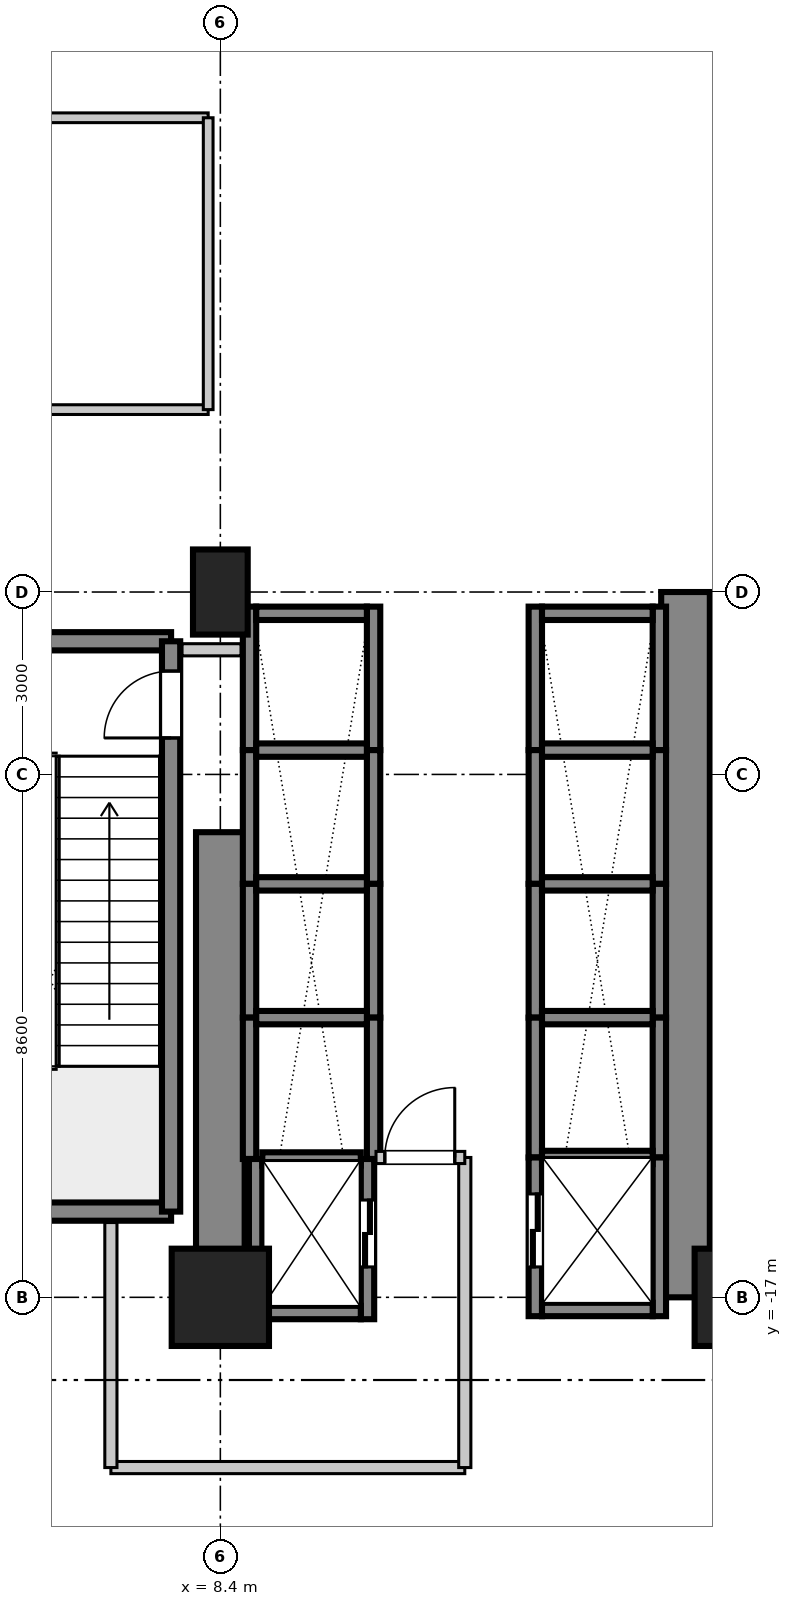
"""IFC4 building model, lengths in metres.
Left out: names, types, materials, properties, quantities, classifications, styles, units other than length and angle.
Written with IfcOpenShell. Run it as: python <this file> out.ifc"""

import sys

from ifc_helpers import new_model, si_unit, direction, frame, frame_2d, origin, origin_2d, place, context, subcontext, project, spatial, rectangle, extrude, source, transform, mapped, element, fill, save


model = new_model("IFC4")
c1 = context("Model", 3, precision=1e-05, world=origin(), true_north=direction((0.0, 1.0)))
c2 = subcontext(c1, "Body", "Model", "MODEL_VIEW")
j1 = project(units=[si_unit("LENGTHUNIT", "METRE"), si_unit("PLANEANGLEUNIT", "RADIAN")], contexts=[c1])
p1 = place(None, origin())
s1 = spatial("IfcSite", under=j1, at=p1, CompositionType="ELEMENT")
p2 = place(p1, origin())
s2 = spatial("IfcBuilding", under=s1, at=p2, CompositionType="ELEMENT")
p3 = place(p2, frame((0.0, 0.0, 21.6)))
s3 = spatial("IfcBuildingStorey", under=s2, at=p3, CompositionType="ELEMENT", Elevation=21.6)
m1 = source(origin(), c2, "Body", "SweptSolid", [
    extrude(rectangle(XDim=1.6, YDim=1.6, at=origin_2d()), origin(), (0.0, 0.0, 1.0), 5.355),
])
p4 = place(p3, frame((8.4, -17.0, 0.0), z_axis=(0.0, 0.0, 1.0), x_axis=(1.0, 0.0, 0.0)))
e1 = element("IfcColumn", 1, at=p4, inside=s3, PredefinedType="COLUMN", context=c2, shape_type="MappedRepresentation", body=[
    mapped(m1, transform((0.0, 0.0, 0.0), scale=1.0)),
])
m2 = source(origin(), c2, "Body", "SweptSolid", [
    extrude(rectangle(XDim=0.9, YDim=1.4, at=origin_2d()), origin(), (0.0, 0.0, 1.0), 5.355),
])
p5 = place(p3, frame((8.4, -5.4, 0.0), z_axis=(0.0, 0.0, 1.0), x_axis=(1.0, 0.0, 0.0)))
e2 = element("IfcColumn", 2, at=p5, inside=s3, PredefinedType="PILASTER", context=c2, shape_type="MappedRepresentation", body=[
    mapped(m2, transform((0.0, 0.0, 0.0), scale=1.0)),
])
p6 = place(p3, frame((17.0, -17.0, 0.0), z_axis=(0.0, 0.0, 1.0), x_axis=(1.0, 0.0, 0.0)))
e3 = element("IfcColumn", 3, at=p6, inside=s3, PredefinedType="COLUMN", context=c2, shape_type="MappedRepresentation", body=[
    mapped(m1, transform((0.0, 0.0, 0.0), scale=1.0)),
])
m3 = source(origin(), c2, "Body", "SweptSolid", [
    extrude(rectangle(XDim=7.65, YDim=0.8, at=frame_2d((3.825, 0.0))), origin(), (0.0, 0.0, 1.0), 4.98),
])
p7 = place(p3, frame((8.4, -17.0, 0.0), z_axis=(0.0, 0.0, 1.0), x_axis=(0.0, 1.0, 0.0)))
e4 = element("IfcWall", 4, at=p7, inside=s3, PredefinedType="SHEAR", context=c2, shape_type="MappedRepresentation", body=[
    mapped(m3, transform((0.0, 0.0, 0.0), scale=1.0)),
])
m4 = source(origin(), c2, "Body", "SweptSolid", [
    extrude(rectangle(XDim=11.6, YDim=0.8, at=frame_2d((5.8, 0.0))), origin(), (0.0, 0.0, 1.0), 4.98),
])
p8 = place(p3, frame((16.05, -17.0, 0.0), z_axis=(0.0, 0.0, 1.0), x_axis=(0.0, 1.0, 0.0)))
e5 = element("IfcWall", 5, at=p8, inside=s3, PredefinedType="SHEAR", context=c2, shape_type="MappedRepresentation", body=[
    mapped(m4, transform((0.0, 0.0, 0.0), scale=1.0)),
])
m5 = source(origin(), c2, "Body", "SweptSolid", [
    extrude(rectangle(XDim=3.98, YDim=0.3, at=frame_2d((1.99, 0.0))), origin(), (0.0, 0.0, 1.0), 4.98),
])
for number, where, z_axis, x_axis in (
    (6, (3.61, -15.59, 0.0), (0.0, 0.0, 1.0), (1.0, 0.0, 0.0)),
    (7, (3.61, -6.21, 0.0), (0.0, 0.0, 1.0), (1.0, 0.0, 0.0)),
):
    element("IfcWall", number, at=place(p3, frame(where, z_axis=z_axis, x_axis=x_axis)), inside=s3, PredefinedType="SHEAR", context=c2, shape_type="MappedRepresentation", body=[
        mapped(m5, transform((0.0, 0.0, 0.0), scale=1.0)),
    ])
m6 = source(origin(), c2, "Body", "SweptSolid", [
    extrude(rectangle(XDim=9.38, YDim=0.3, at=frame_2d((4.69, 0.0))), origin(), (0.0, 0.0, 1.0), 4.98),
])
p9 = place(p3, frame((7.59, -15.59, 0.0), z_axis=(0.0, 0.0, 1.0), x_axis=(0.0, 1.0, 0.0)))
e8 = element("IfcWall", 8, at=p9, inside=s3, PredefinedType="SHEAR", context=c2, shape_type="MappedRepresentation", body=[
    mapped(m6, transform((0.0, 0.0, 0.0), scale=1.0)),
])
p10 = place(p9, frame((7.79, 0.0, 0.0)))
e9 = element("IfcOpeningElement", 9, at=p10, cuts=e8, PredefinedType="OPENING", context=c2, shape_type="SweptSolid", body=[
    extrude(rectangle(XDim=1.1, YDim=2.15, at=frame_2d((0.55, 1.075))), frame((0.0, 0.16, 0.0), z_axis=(0.0, -1.0, 0.0), x_axis=(1.0, 0.0, 0.0)), (0.0, 0.0, 1.0), 0.32),
])
m7 = source(origin(), c2, "Body", "SweptSolid", [
    extrude(rectangle(XDim=2.36, YDim=0.22, at=frame_2d((1.18, 0.0))), origin(), (0.0, 0.0, 1.0), 4.98),
])
for number, where, z_axis, x_axis in (
    (10, (13.58, -8.0, 0.0), (0.0, 0.0, 1.0), (0.0, 1.0, 0.0)),
    (11, (15.62, -8.0, 0.0), (0.0, 0.0, 1.0), (0.0, 1.0, 0.0)),
):
    element("IfcWall", number, at=place(p3, frame(where, z_axis=z_axis, x_axis=x_axis)), inside=s3, PredefinedType="SHEAR", context=c2, shape_type="MappedRepresentation", body=[
        mapped(m7, transform((0.0, 0.0, 0.0), scale=1.0)),
    ])
m8 = source(origin(), c2, "Body", "SweptSolid", [
    extrude(rectangle(XDim=1.82, YDim=0.22, at=frame_2d((0.91, 0.0))), origin(), (0.0, 0.0, 1.0), 4.98),
])
p11 = place(p3, frame((13.69, -5.75, 0.0), z_axis=(0.0, 0.0, 1.0), x_axis=(1.0, 0.0, 0.0)))
e12 = element("IfcWall", 12, at=p11, inside=s3, PredefinedType="SHEAR", context=c2, shape_type="MappedRepresentation", body=[
    mapped(m8, transform((0.0, 0.0, 0.0), scale=1.0)),
])
m9 = source(origin(), c2, "Body", "SweptSolid", [
    extrude(rectangle(XDim=2.2, YDim=0.22, at=frame_2d((1.1, 0.0))), origin(), (0.0, 0.0, 1.0), 4.98),
])
for number, where, z_axis, x_axis in (
    (13, (13.58, -10.2, 0.0), (0.0, 0.0, 1.0), (0.0, 1.0, 0.0)),
    (14, (15.62, -10.2, 0.0), (0.0, 0.0, 1.0), (0.0, 1.0, 0.0)),
):
    element("IfcWall", number, at=place(p3, frame(where, z_axis=z_axis, x_axis=x_axis)), inside=s3, PredefinedType="SHEAR", context=c2, shape_type="MappedRepresentation", body=[
        mapped(m9, transform((0.0, 0.0, 0.0), scale=1.0)),
    ])
m10 = source(origin(), c2, "Body", "SweptSolid", [
    extrude(rectangle(XDim=1.82, YDim=0.22, at=frame_2d((0.91, 0.0))), origin(), (0.0, 0.0, 1.0), 5.4),
])
p12 = place(p3, frame((13.69, -8.0, 0.0), z_axis=(0.0, 0.0, 1.0), x_axis=(1.0, 0.0, 0.0)))
e15 = element("IfcWall", 15, at=p12, inside=s3, PredefinedType="SHEAR", context=c2, shape_type="MappedRepresentation", body=[
    mapped(m10, transform((0.0, 0.0, 0.0), scale=1.0)),
])
for number, where, z_axis, x_axis in (
    (16, (13.58, -12.4, 0.0), (0.0, 0.0, 1.0), (0.0, 1.0, 0.0)),
    (17, (15.62, -12.4, 0.0), (0.0, 0.0, 1.0), (0.0, 1.0, 0.0)),
):
    element("IfcWall", number, at=place(p3, frame(where, z_axis=z_axis, x_axis=x_axis)), inside=s3, PredefinedType="SHEAR", context=c2, shape_type="MappedRepresentation", body=[
        mapped(m9, transform((0.0, 0.0, 0.0), scale=1.0)),
    ])
p13 = place(p3, frame((13.69, -10.2, 0.0), z_axis=(0.0, 0.0, 1.0), x_axis=(1.0, 0.0, 0.0)))
e18 = element("IfcWall", 18, at=p13, inside=s3, PredefinedType="SHEAR", context=c2, shape_type="MappedRepresentation", body=[
    mapped(m10, transform((0.0, 0.0, 0.0), scale=1.0)),
])
m11 = source(origin(), c2, "Body", "SweptSolid", [
    extrude(rectangle(XDim=2.3, YDim=0.22, at=frame_2d((1.15, 0.0))), origin(), (0.0, 0.0, 1.0), 4.98),
])
for number, where, z_axis, x_axis in (
    (19, (13.58, -14.7, 0.0), (0.0, 0.0, 1.0), (0.0, 1.0, 0.0)),
    (20, (15.62, -14.7, 0.0), (0.0, 0.0, 1.0), (0.0, 1.0, 0.0)),
):
    element("IfcWall", number, at=place(p3, frame(where, z_axis=z_axis, x_axis=x_axis)), inside=s3, PredefinedType="SHEAR", context=c2, shape_type="MappedRepresentation", body=[
        mapped(m11, transform((0.0, 0.0, 0.0), scale=1.0)),
    ])
p14 = place(p3, frame((13.69, -12.4, 0.0), z_axis=(0.0, 0.0, 1.0), x_axis=(1.0, 0.0, 0.0)))
e21 = element("IfcWall", 21, at=p14, inside=s3, PredefinedType="SHEAR", context=c2, shape_type="MappedRepresentation", body=[
    mapped(m10, transform((0.0, 0.0, 0.0), scale=1.0)),
])
for number, where, z_axis, x_axis in (
    (22, (8.88, -8.0, 0.0), (0.0, 0.0, 1.0), (0.0, 1.0, 0.0)),
    (23, (10.92, -8.0, 0.0), (0.0, 0.0, 1.0), (0.0, 1.0, 0.0)),
):
    element("IfcWall", number, at=place(p3, frame(where, z_axis=z_axis, x_axis=x_axis)), inside=s3, PredefinedType="SHEAR", context=c2, shape_type="MappedRepresentation", body=[
        mapped(m7, transform((0.0, 0.0, 0.0), scale=1.0)),
    ])
p15 = place(p3, frame((8.99, -5.75, 0.0), z_axis=(0.0, 0.0, 1.0), x_axis=(1.0, 0.0, 0.0)))
e24 = element("IfcWall", 24, at=p15, inside=s3, PredefinedType="SHEAR", context=c2, shape_type="MappedRepresentation", body=[
    mapped(m8, transform((0.0, 0.0, 0.0), scale=1.0)),
])
for number, where, z_axis, x_axis in (
    (25, (8.88, -10.2, 0.0), (0.0, 0.0, 1.0), (0.0, 1.0, 0.0)),
    (26, (10.92, -10.2, 0.0), (0.0, 0.0, 1.0), (0.0, 1.0, 0.0)),
):
    element("IfcWall", number, at=place(p3, frame(where, z_axis=z_axis, x_axis=x_axis)), inside=s3, PredefinedType="SHEAR", context=c2, shape_type="MappedRepresentation", body=[
        mapped(m9, transform((0.0, 0.0, 0.0), scale=1.0)),
    ])
p16 = place(p3, frame((8.99, -8.0, 0.0), z_axis=(0.0, 0.0, 1.0), x_axis=(1.0, 0.0, 0.0)))
e27 = element("IfcWall", 27, at=p16, inside=s3, PredefinedType="SHEAR", context=c2, shape_type="MappedRepresentation", body=[
    mapped(m10, transform((0.0, 0.0, 0.0), scale=1.0)),
])
for number, where, z_axis, x_axis in (
    (28, (8.88, -12.4, 0.0), (0.0, 0.0, 1.0), (0.0, 1.0, 0.0)),
    (29, (10.92, -12.4, 0.0), (0.0, 0.0, 1.0), (0.0, 1.0, 0.0)),
):
    element("IfcWall", number, at=place(p3, frame(where, z_axis=z_axis, x_axis=x_axis)), inside=s3, PredefinedType="SHEAR", context=c2, shape_type="MappedRepresentation", body=[
        mapped(m9, transform((0.0, 0.0, 0.0), scale=1.0)),
    ])
p17 = place(p3, frame((8.99, -10.2, 0.0), z_axis=(0.0, 0.0, 1.0), x_axis=(1.0, 0.0, 0.0)))
e30 = element("IfcWall", 30, at=p17, inside=s3, PredefinedType="SHEAR", context=c2, shape_type="MappedRepresentation", body=[
    mapped(m10, transform((0.0, 0.0, 0.0), scale=1.0)),
])
m12 = source(origin(), c2, "Body", "SweptSolid", [
    extrude(rectangle(XDim=2.325, YDim=0.22, at=frame_2d((1.163, 0.0))), origin(), (0.0, 0.0, 1.0), 4.98),
])
for number, where, z_axis, x_axis in (
    (31, (8.88, -14.725, 0.0), (0.0, 0.0, 1.0), (0.0, 1.0, 0.0)),
    (32, (10.92, -14.725, 0.0), (0.0, 0.0, 1.0), (0.0, 1.0, 0.0)),
):
    element("IfcWall", number, at=place(p3, frame(where, z_axis=z_axis, x_axis=x_axis)), inside=s3, PredefinedType="SHEAR", context=c2, shape_type="MappedRepresentation", body=[
        mapped(m12, transform((0.0, 0.0, 0.0), scale=1.0)),
    ])
p18 = place(p3, frame((8.99, -12.4, 0.0), z_axis=(0.0, 0.0, 1.0), x_axis=(1.0, 0.0, 0.0)))
e33 = element("IfcWall", 33, at=p18, inside=s3, PredefinedType="SHEAR", context=c2, shape_type="MappedRepresentation", body=[
    mapped(m10, transform((0.0, 0.0, 0.0), scale=1.0)),
])
m13 = source(origin(), c2, "Body", "SweptSolid", [
    extrude(rectangle(XDim=2.635, YDim=0.22, at=frame_2d((1.317, 0.0))), origin(), (0.0, 0.0, 1.0), 4.98),
])
p19 = place(p3, frame((8.98, -17.36, 0.0), z_axis=(0.0, 0.0, 1.0), x_axis=(0.0, 1.0, 0.0)))
e34 = element("IfcWall", 34, at=p19, inside=s3, PredefinedType="SHEAR", context=c2, shape_type="MappedRepresentation", body=[
    mapped(m13, transform((0.0, 0.0, 0.0), scale=1.0)),
])
p20 = place(p3, frame((10.82, -17.36, 0.0), z_axis=(0.0, 0.0, 1.0), x_axis=(0.0, 1.0, 0.0)))
e35 = element("IfcWall", 35, at=p20, inside=s3, PredefinedType="SHEAR", context=c2, shape_type="MappedRepresentation", body=[
    mapped(m13, transform((0.0, 0.0, 0.0), scale=1.0)),
])
p21 = place(p20, frame((0.86, 0.0, 0.0)))
e36 = element("IfcOpeningElement", 36, at=p21, cuts=e35, PredefinedType="OPENING", context=c2, shape_type="SweptSolid", body=[
    extrude(rectangle(XDim=1.1, YDim=2.2, at=frame_2d((0.55, 1.1))), frame((0.0, 0.12, 0.0), z_axis=(0.0, -1.0, 0.0), x_axis=(1.0, 0.0, 0.0)), (0.0, 0.0, 1.0), 0.24),
])
m14 = source(origin(), c2, "Body", "SweptSolid", [
    extrude(rectangle(XDim=1.62, YDim=0.22, at=frame_2d((0.81, 0.0))), origin(), (0.0, 0.0, 1.0), 4.98),
])
p22 = place(p3, frame((9.09, -17.25, 0.0), z_axis=(0.0, 0.0, 1.0), x_axis=(1.0, 0.0, 0.0)))
e37 = element("IfcWall", 37, at=p22, inside=s3, PredefinedType="SHEAR", context=c2, shape_type="MappedRepresentation", body=[
    mapped(m14, transform((0.0, 0.0, 0.0), scale=1.0)),
])
m15 = source(origin(), c2, "Body", "SweptSolid", [
    extrude(rectangle(XDim=1.62, YDim=0.22, at=frame_2d((0.81, 0.0))), origin(), (0.0, 0.0, 1.0), 5.4),
])
p23 = place(p3, frame((9.09, -14.725, 0.0), z_axis=(0.0, 0.0, 1.0), x_axis=(1.0, 0.0, 0.0)))
e38 = element("IfcWall", 38, at=p23, inside=s3, PredefinedType="SHEAR", context=c2, shape_type="MappedRepresentation", body=[
    mapped(m15, transform((0.0, 0.0, 0.0), scale=1.0)),
])
m16 = source(origin(), c2, "Body", "SweptSolid", [
    extrude(rectangle(XDim=2.61, YDim=0.22, at=frame_2d((1.305, 0.0))), origin(), (0.0, 0.0, 1.0), 4.98),
])
p24 = place(p3, frame((13.58, -17.31, 0.0), z_axis=(0.0, 0.0, 1.0), x_axis=(0.0, 1.0, 0.0)))
e39 = element("IfcWall", 39, at=p24, inside=s3, PredefinedType="SHEAR", context=c2, shape_type="MappedRepresentation", body=[
    mapped(m16, transform((0.0, 0.0, 0.0), scale=1.0)),
])
p25 = place(p24, frame((0.81, 0.0, 0.0)))
e40 = element("IfcOpeningElement", 40, at=p25, cuts=e39, PredefinedType="OPENING", context=c2, shape_type="SweptSolid", body=[
    extrude(rectangle(XDim=1.2, YDim=2.2, at=frame_2d((0.6, 1.1))), frame((0.0, 0.12, 0.0), z_axis=(0.0, -1.0, 0.0), x_axis=(1.0, 0.0, 0.0)), (0.0, 0.0, 1.0), 0.24),
])
p26 = place(p3, frame((15.62, -17.31, 0.0), z_axis=(0.0, 0.0, 1.0), x_axis=(0.0, 1.0, 0.0)))
e41 = element("IfcWall", 41, at=p26, inside=s3, PredefinedType="SHEAR", context=c2, shape_type="MappedRepresentation", body=[
    mapped(m16, transform((0.0, 0.0, 0.0), scale=1.0)),
])
p27 = place(p3, frame((13.69, -17.2, 0.0), z_axis=(0.0, 0.0, 1.0), x_axis=(1.0, 0.0, 0.0)))
e42 = element("IfcWall", 42, at=p27, inside=s3, PredefinedType="SHEAR", context=c2, shape_type="MappedRepresentation", body=[
    mapped(m8, transform((0.0, 0.0, 0.0), scale=1.0)),
])
p28 = place(p3, frame((13.69, -14.7, 0.0), z_axis=(0.0, 0.0, 1.0), x_axis=(1.0, 0.0, 0.0)))
e43 = element("IfcWall", 43, at=p28, inside=s3, PredefinedType="SHEAR", context=c2, shape_type="MappedRepresentation", body=[
    mapped(m10, transform((0.0, 0.0, 0.0), scale=1.0)),
])
m17 = source(origin(), c2, "Body", "SweptSolid", [
    extrude(rectangle(XDim=5.82, YDim=0.2, at=frame_2d((2.91, 0.0))), origin(), (0.0, 0.0, 1.0), 3.1),
])
p29 = place(p3, frame((6.6, -19.8, 0.0), z_axis=(0.0, 0.0, 1.0), x_axis=(1.0, 0.0, 0.0)))
e44 = element("IfcWall", 44, at=p29, inside=s3, PredefinedType="PARTITIONING", context=c2, shape_type="MappedRepresentation", body=[
    mapped(m17, transform((0.0, 0.0, 0.0), scale=1.0)),
])
m18 = source(origin(), c2, "Body", "SweptSolid", [
    extrude(rectangle(XDim=4.03, YDim=0.2, at=frame_2d((2.015, 0.0))), origin(), (0.0, 0.0, 1.0), 3.1),
])
p30 = place(p3, frame((6.6, -19.8, 0.0), z_axis=(0.0, 0.0, 1.0), x_axis=(0.0, 1.0, 0.0)))
e45 = element("IfcWall", 45, at=p30, inside=s3, PredefinedType="PARTITIONING", context=c2, shape_type="MappedRepresentation", body=[
    mapped(m18, transform((0.0, 0.0, 0.0), scale=1.0)),
])
m19 = source(origin(), c2, "Body", "SweptSolid", [
    extrude(rectangle(XDim=5.1, YDim=0.2, at=frame_2d((2.55, 0.0))), origin(), (0.0, 0.0, 1.0), 3.1),
])
p31 = place(p3, frame((12.42, -19.8, 0.0), z_axis=(0.0, 0.0, 1.0), x_axis=(0.0, 1.0, 0.0)))
e46 = element("IfcWall", 46, at=p31, inside=s3, PredefinedType="PARTITIONING", context=c2, shape_type="MappedRepresentation", body=[
    mapped(m19, transform((0.0, 0.0, 0.0), scale=1.0)),
])
m20 = source(origin(), c2, "Body", "SweptSolid", [
    extrude(rectangle(XDim=1.46, YDim=0.2, at=frame_2d((0.73, 0.0))), origin(), (0.0, 0.0, 1.0), 3.1),
])
p32 = place(p3, frame((10.96, -14.7, 0.0), z_axis=(0.0, 0.0, 1.0), x_axis=(1.0, 0.0, 0.0)))
e47 = element("IfcWall", 47, at=p32, inside=s3, PredefinedType="PARTITIONING", context=c2, shape_type="MappedRepresentation", body=[
    mapped(m20, transform((0.0, 0.0, 0.0), scale=1.0)),
])
p33 = place(p32, frame((0.145, 0.0, 0.0)))
e48 = element("IfcOpeningElement", 48, at=p33, cuts=e47, PredefinedType="OPENING", context=c2, shape_type="SweptSolid", body=[
    extrude(rectangle(XDim=1.15, YDim=2.15, at=frame_2d((0.575, 1.075))), frame((0.0, 0.11, 0.0), z_axis=(0.0, -1.0, 0.0), x_axis=(1.0, 0.0, 0.0)), (0.0, 0.0, 1.0), 0.22),
])
m21 = source(origin(), c2, "Body", "SweptSolid", [
    extrude(rectangle(XDim=0.97, YDim=0.2, at=frame_2d((0.485, 0.0))), origin(), (0.0, 0.0, 1.0), 3.1),
])
p34 = place(p3, frame((7.77, -6.35, 0.0), z_axis=(0.0, 0.0, 1.0), x_axis=(1.0, 0.0, 0.0)))
e49 = element("IfcWall", 49, at=p34, inside=s3, PredefinedType="PARTITIONING", context=c2, shape_type="MappedRepresentation", body=[
    mapped(m21, transform((0.0, 0.0, 0.0), scale=1.0)),
])
m22 = source(origin(), c2, "Body", "SweptSolid", [
    extrude(rectangle(XDim=19.6, YDim=0.16, at=frame_2d((9.8, 0.0))), origin(), (0.0, 0.0, 1.0), 3.1),
])
p35 = place(p3, frame((-11.4, -2.4, 0.0), z_axis=(0.0, 0.0, 1.0), x_axis=(1.0, 0.0, 0.0)))
e50 = element("IfcWall", 50, at=p35, inside=s3, PredefinedType="PARTITIONING", context=c2, shape_type="MappedRepresentation", body=[
    mapped(m22, transform((0.0, 0.0, 0.0), scale=1.0)),
])
p36 = place(p3, frame((-11.4, 2.4, 0.0), z_axis=(0.0, 0.0, 1.0), x_axis=(1.0, 0.0, 0.0)))
e51 = element("IfcWall", 51, at=p36, inside=s3, PredefinedType="PARTITIONING", context=c2, shape_type="MappedRepresentation", body=[
    mapped(m22, transform((0.0, 0.0, 0.0), scale=1.0)),
])
p37 = place(p36, frame((10.601, 0.0, 0.0)))
e52 = element("IfcOpeningElement", 52, at=p37, cuts=e51, PredefinedType="OPENING", context=c2, shape_type="SweptSolid", body=[
    extrude(rectangle(XDim=1.5, YDim=2.15, at=frame_2d((0.75, 1.075))), frame((0.0, 0.09, 0.0), z_axis=(0.0, -1.0, 0.0), x_axis=(1.0, 0.0, 0.0)), (0.0, 0.0, 1.0), 0.18),
])
m23 = source(origin(), c2, "Body", "SweptSolid", [
    extrude(rectangle(XDim=4.8, YDim=0.16, at=frame_2d((2.4, 0.0))), origin(), (0.0, 0.0, 1.0), 3.1),
])
p38 = place(p3, frame((8.2, -2.4, 0.0), z_axis=(0.0, 0.0, 1.0), x_axis=(0.0, 1.0, 0.0)))
e53 = element("IfcWall", 53, at=p38, inside=s3, PredefinedType="PARTITIONING", context=c2, shape_type="MappedRepresentation", body=[
    mapped(m23, transform((0.0, 0.0, 0.0), scale=1.0)),
])
m24 = source(origin(), c2, "Body", "SweptSolid", [
    extrude(rectangle(XDim=1.1, YDim=2.15, at=frame_2d((0.55, 1.075))), frame((0.0, 0.025, 0.0), z_axis=(0.0, -1.0, 0.0), x_axis=(1.0, 0.0, 0.0)), (0.0, 0.0, 1.0), 0.05),
])
p39 = place(p10, origin())
e54 = element("IfcDoor", 54, at=p39, inside=s3, OperationType="SINGLE_SWING_LEFT", PredefinedType="DOOR", context=c2, shape_type="MappedRepresentation", body=[
    mapped(m24, transform((0.0, 0.0, 0.0), scale=1.0)),
])
fill(e9, e54)
m25 = source(origin(), c2, "Body", "SweptSolid", [
    extrude(rectangle(XDim=1.1, YDim=2.2, at=frame_2d((0.55, 1.1))), frame((0.0, 0.025, 0.0), z_axis=(0.0, -1.0, 0.0), x_axis=(1.0, 0.0, 0.0)), (0.0, 0.0, 1.0), 0.05),
])
p40 = place(p21, frame((1.1, 0.0, 0.0), z_axis=(0.0, 0.0, 1.0), x_axis=(-1.0, 0.0, 0.0)))
e55 = element("IfcDoor", 55, at=p40, inside=s3, OperationType="DOUBLE_DOOR_SLIDING", PredefinedType="DOOR", context=c2, shape_type="MappedRepresentation", body=[
    mapped(m25, transform((0.0, 0.0, 0.0), scale=1.0)),
])
fill(e36, e55)
m26 = source(origin(), c2, "Body", "SweptSolid", [
    extrude(rectangle(XDim=1.2, YDim=2.2, at=frame_2d((0.6, 1.1))), frame((0.0, 0.025, 0.0), z_axis=(0.0, -1.0, 0.0), x_axis=(1.0, 0.0, 0.0)), (0.0, 0.0, 1.0), 0.05),
])
p41 = place(p25, origin())
e56 = element("IfcDoor", 56, at=p41, inside=s3, OperationType="DOUBLE_DOOR_SLIDING", PredefinedType="DOOR", context=c2, shape_type="MappedRepresentation", body=[
    mapped(m26, transform((0.0, 0.0, 0.0), scale=1.0)),
])
fill(e40, e56)
m27 = source(origin(), c2, "Body", "SweptSolid", [
    extrude(rectangle(XDim=1.15, YDim=2.15, at=frame_2d((0.575, 1.075))), frame((0.0, 0.025, 0.0), z_axis=(0.0, -1.0, 0.0), x_axis=(1.0, 0.0, 0.0)), (0.0, 0.0, 1.0), 0.05),
])
p42 = place(p33, origin())
e57 = element("IfcDoor", 57, at=p42, inside=s3, OperationType="SINGLE_SWING_RIGHT", PredefinedType="DOOR", context=c2, shape_type="MappedRepresentation", body=[
    mapped(m27, transform((0.0, 0.0, 0.0), scale=1.0)),
])
fill(e48, e57)
save(model, sys.argv[1])
